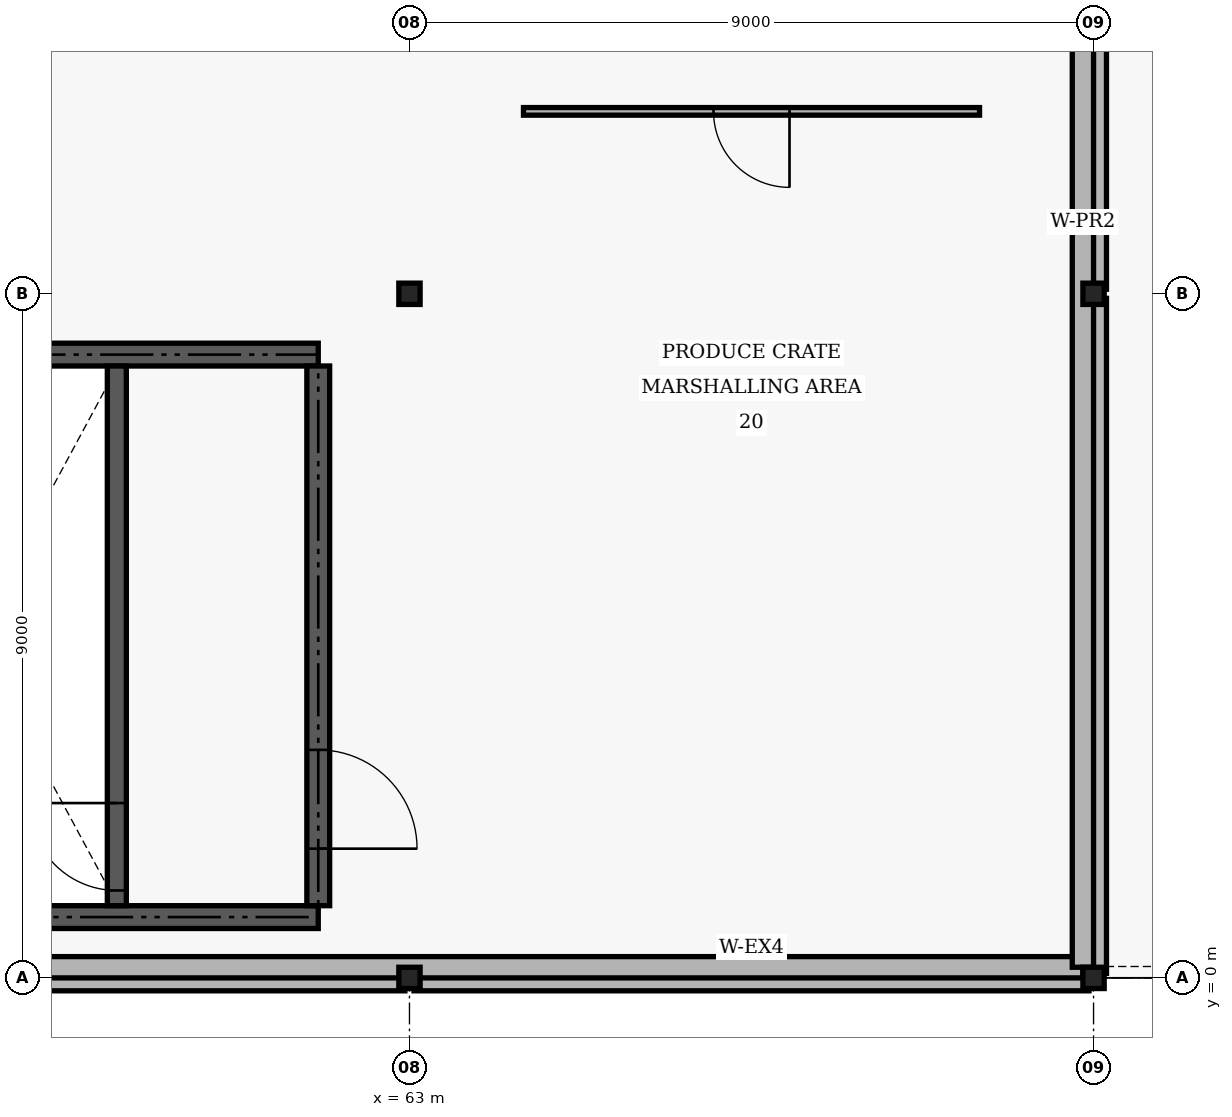
"""IFC4 building model, lengths in metres.
Left out: names, types, materials, properties, quantities, classifications, styles, units other than length and angle.
Written with IfcOpenShell. Run it as: python <this file> out.ifc"""

import sys

from ifc_helpers import new_model, si_unit, direction, frame, frame_2d, origin, origin_2d, place, context, subcontext, project, spatial, rectangle, i_section, extrude, element, fill, save


model = new_model("IFC4")
c1 = context("Model", 3, precision=1e-05, world=origin(), true_north=direction((0.0, 1.0)))
c2 = subcontext(c1, "Body", "Model", "MODEL_VIEW")
j1 = project(units=[si_unit("LENGTHUNIT", "METRE"), si_unit("PLANEANGLEUNIT", "RADIAN")], contexts=[c1])
p1 = place(None, origin())
s1 = spatial("IfcSite", under=j1, at=p1, CompositionType="ELEMENT")
p2 = place(p1, origin())
s2 = spatial("IfcBuilding", under=s1, at=p2, CompositionType="ELEMENT")
p3 = place(p2, frame((0.0, 0.0, 13.5)))
s3 = spatial("IfcBuildingStorey", under=s2, at=p3, CompositionType="ELEMENT", Elevation=13.5)
for number, where, z_axis, x_axis in (
    (1, (63.0, 0.0, 0.0), (0.0, 0.0, 1.0), (1.0, 0.0, 0.0)),
    (2, (63.0, 9.0, 0.0), (0.0, 0.0, 1.0), (1.0, 0.0, 0.0)),
    (3, (72.0, 0.0, 0.0), (0.0, 0.0, 1.0), (1.0, 0.0, 0.0)),
    (4, (72.0, 9.0, 0.0), (0.0, 0.0, 1.0), (1.0, 0.0, 0.0)),
):
    element("IfcColumn", number, at=place(p3, frame(where, z_axis=z_axis, x_axis=x_axis)), inside=s3, PredefinedType="COLUMN", context=c2, shape_type="SweptSolid", body=[
        extrude(i_section(OverallWidth=0.28, OverallDepth=0.28, WebThickness=0.01, FlangeThickness=0.018, FilletRadius=0.024, at=origin_2d()), origin(), (0.0, 0.0, 1.0), 3.9),
    ])
for number, where, z_axis, x_axis in (
    (5, (54.06, 0.0, 0.0), (0.0, 0.0, 1.0), (1.0, 0.0, 0.0)),
    (6, (63.06, 0.0, 0.0), (0.0, 0.0, 1.0), (1.0, 0.0, 0.0)),
    (7, (72.0, 0.06, 0.0), (0.0, 0.0, 1.0), (0.0, 1.0, 0.0)),
):
    element("IfcWall", number, at=place(p3, frame(where, z_axis=z_axis, x_axis=x_axis)), inside=s3, PredefinedType="SOLIDWALL", context=c2, shape_type="SweptSolid", body=[
        extrude(rectangle(XDim=8.88, YDim=0.34, at=frame_2d((4.44, 0.0))), origin(), (0.0, 0.0, 1.0), 3.2),
    ])
p4 = place(p3, frame((72.0, 9.06, 0.0), z_axis=(0.0, 0.0, 1.0), x_axis=(0.0, 1.0, 0.0)))
e8 = element("IfcWall", 8, at=p4, inside=s3, PredefinedType="SOLIDWALL", context=c2, shape_type="SweptSolid", body=[
    extrude(rectangle(XDim=8.88, YDim=0.34, at=frame_2d((4.44, 0.0))), origin(), (0.0, 0.0, 1.0), 3.2),
])
p5 = place(p4, frame((3.84, 0.0, 0.0)))
e9 = element("IfcOpeningElement", 9, at=p5, cuts=e8, PredefinedType="OPENING", context=c2, shape_type="SweptSolid", body=[
    extrude(rectangle(XDim=1.2, YDim=2.15, at=frame_2d((0.6, 1.075))), frame((0.0, 0.18, 0.0), z_axis=(0.0, -1.0, 0.0), x_axis=(1.0, 0.0, 0.0)), (0.0, 0.0, 1.0), 0.36),
])
p6 = place(p3, frame((18.14, 0.14, 3.9), z_axis=(0.0, 0.0, 1.0), x_axis=(1.0, 0.0, 0.0)))
e10 = element("IfcWall", 10, at=p6, inside=s3, PredefinedType="PARAPET", context=c2, shape_type="SweptSolid", body=[
    extrude(rectangle(XDim=53.72, YDim=0.28, at=frame_2d((26.86, 0.0))), origin(), (0.0, 0.0, 1.0), 1.2),
])
p7 = place(p3, frame((71.86, 0.14, 3.9), z_axis=(0.0, 0.0, 1.0), x_axis=(0.0, 1.0, 0.0)))
e11 = element("IfcWall", 11, at=p7, inside=s3, PredefinedType="PARAPET", context=c2, shape_type="SweptSolid", body=[
    extrude(rectangle(XDim=17.72, YDim=0.28, at=frame_2d((8.86, 0.0))), origin(), (0.0, 0.0, 1.0), 1.2),
])
for number, where, z_axis, x_axis in (
    (12, (55.2, 0.8, 0.0), (0.0, 0.0, 1.0), (1.0, 0.0, 0.0)),
    (13, (55.2, 8.2, 0.0), (0.0, 0.0, 1.0), (1.0, 0.0, 0.0)),
):
    element("IfcWall", number, at=place(p3, frame(where, z_axis=z_axis, x_axis=x_axis)), inside=s3, PredefinedType="SHEAR", context=c2, shape_type="SweptSolid", body=[
        extrude(rectangle(XDim=6.6, YDim=0.3, at=frame_2d((3.3, 0.0))), origin(), (0.0, 0.0, 1.0), 3.7),
    ])
p8 = place(p3, frame((61.8, 0.95, 0.0), z_axis=(0.0, 0.0, 1.0), x_axis=(0.0, 1.0, 0.0)))
e14 = element("IfcWall", 14, at=p8, inside=s3, PredefinedType="SHEAR", context=c2, shape_type="SweptSolid", body=[
    extrude(rectangle(XDim=7.1, YDim=0.3, at=frame_2d((3.55, 0.0))), origin(), (0.0, 0.0, 1.0), 3.7),
])
p9 = place(p8, frame((0.75, 0.0, 0.0)))
e15 = element("IfcOpeningElement", 15, at=p9, cuts=e14, PredefinedType="OPENING", context=c2, shape_type="SweptSolid", body=[
    extrude(rectangle(XDim=1.3, YDim=2.15, at=frame_2d((0.65, 1.075))), frame((0.0, 0.16, 0.0), z_axis=(0.0, -1.0, 0.0), x_axis=(1.0, 0.0, 0.0)), (0.0, 0.0, 1.0), 0.32),
])
p10 = place(p3, frame((59.15, 0.95, 0.0), z_axis=(0.0, 0.0, 1.0), x_axis=(0.0, 1.0, 0.0)))
e16 = element("IfcWall", 16, at=p10, inside=s3, PredefinedType="SHEAR", context=c2, shape_type="SweptSolid", body=[
    extrude(rectangle(XDim=7.1, YDim=0.25, at=frame_2d((3.55, 0.0))), origin(), (0.0, 0.0, 1.0), 3.7),
])
p11 = place(p10, frame((0.2, 0.0, 0.0)))
e17 = element("IfcOpeningElement", 17, at=p11, cuts=e16, PredefinedType="OPENING", context=c2, shape_type="SweptSolid", body=[
    extrude(rectangle(XDim=1.15, YDim=2.15, at=frame_2d((0.575, 1.075))), frame((0.0, 0.135, 0.0), z_axis=(0.0, -1.0, 0.0), x_axis=(1.0, 0.0, 0.0)), (0.0, 0.0, 1.0), 0.27),
])
p12 = place(p3, frame((64.5, 11.4, 0.0), z_axis=(0.0, 0.0, 1.0), x_axis=(1.0, 0.0, 0.0)))
e18 = element("IfcWall", 18, at=p12, inside=s3, PredefinedType="PARTITIONING", context=c2, shape_type="SweptSolid", body=[
    extrude(rectangle(XDim=6.0, YDim=0.1, at=frame_2d((3.0, 0.0))), origin(), (0.0, 0.0, 1.0), 2.9),
])
p13 = place(p12, frame((2.5, 0.0, 0.0)))
e19 = element("IfcOpeningElement", 19, at=p13, cuts=e18, PredefinedType="OPENING", context=c2, shape_type="SweptSolid", body=[
    extrude(rectangle(XDim=1.0, YDim=2.1, at=frame_2d((0.5, 1.05))), frame((0.0, 0.06, 0.0), z_axis=(0.0, -1.0, 0.0), x_axis=(1.0, 0.0, 0.0)), (0.0, 0.0, 1.0), 0.12),
])
p14 = place(p9, frame((1.3, 0.0, 0.0), z_axis=(0.0, 0.0, 1.0), x_axis=(-1.0, 0.0, 0.0)))
e20 = element("IfcDoor", 20, at=p14, inside=s3, OperationType="DOUBLE_DOOR_SINGLE_SWING", PredefinedType="DOOR", context=c2, shape_type="SweptSolid", body=[
    extrude(rectangle(XDim=1.3, YDim=2.15, at=frame_2d((0.65, 1.075))), frame((0.0, 0.025, 0.0), z_axis=(0.0, -1.0, 0.0), x_axis=(1.0, 0.0, 0.0)), (0.0, 0.0, 1.0), 0.05),
])
fill(e15, e20)
p15 = place(p11, frame((1.15, 0.0, 0.0), z_axis=(0.0, 0.0, 1.0), x_axis=(-1.0, 0.0, 0.0)))
e21 = element("IfcDoor", 21, at=p15, inside=s3, OperationType="SINGLE_SWING_RIGHT", PredefinedType="DOOR", context=c2, shape_type="SweptSolid", body=[
    extrude(rectangle(XDim=1.15, YDim=2.15, at=frame_2d((0.575, 1.075))), frame((0.0, 0.025, 0.0), z_axis=(0.0, -1.0, 0.0), x_axis=(1.0, 0.0, 0.0)), (0.0, 0.0, 1.0), 0.05),
])
fill(e17, e21)
p16 = place(p13, origin())
e22 = element("IfcDoor", 22, at=p16, inside=s3, OperationType="SINGLE_SWING_RIGHT", PredefinedType="DOOR", context=c2, shape_type="SweptSolid", body=[
    extrude(rectangle(XDim=1.0, YDim=2.1, at=frame_2d((0.5, 1.05))), frame((0.0, 0.025, 0.0), z_axis=(0.0, -1.0, 0.0), x_axis=(1.0, 0.0, 0.0)), (0.0, 0.0, 1.0), 0.05),
])
fill(e19, e22)
save(model, sys.argv[1])
